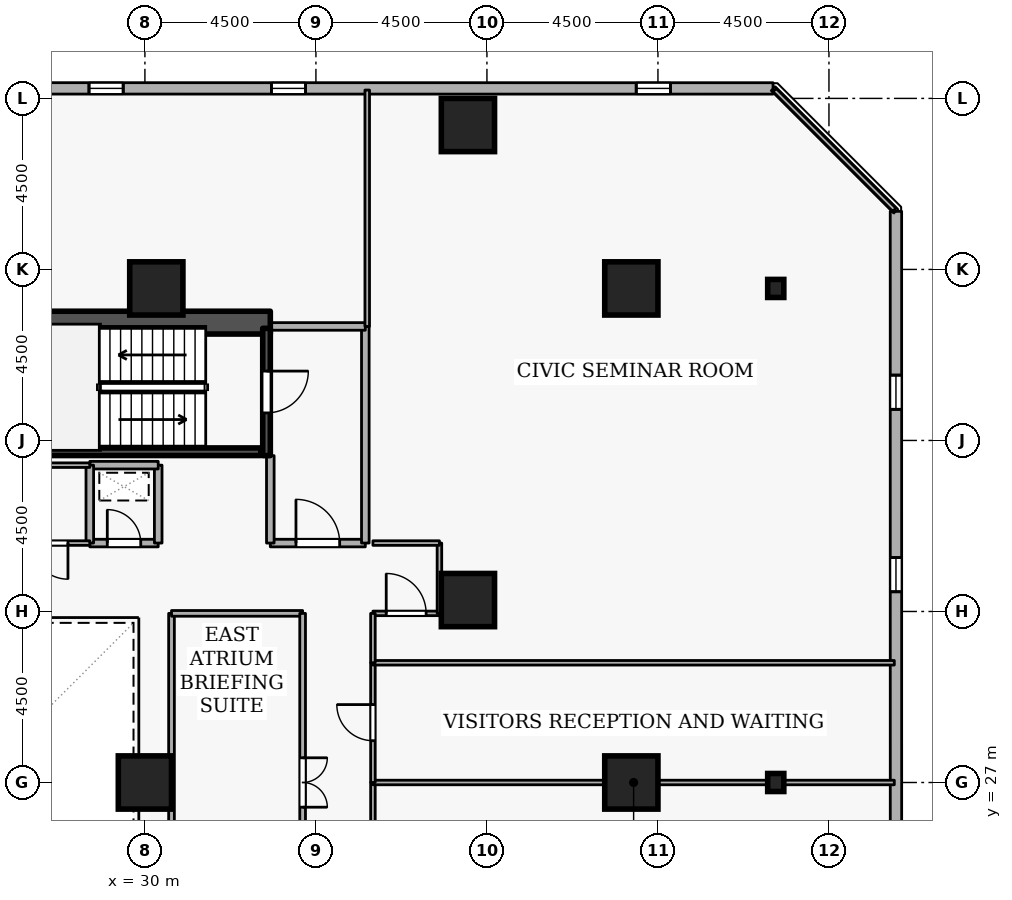
"""IFC4 building model, lengths in metres.
Left out: names, types, materials, properties, quantities, classifications, styles, units other than length and angle.
Written with IfcOpenShell. Run it as: python <this file> out.ifc"""

import sys

from ifc_helpers import new_model, si_unit, direction, frame, frame_2d, origin, origin_2d, place, context, subcontext, project, spatial, rectangle, i_section, extrude, element, fill, save


model = new_model("IFC4")
c1 = context("Model", 3, precision=1e-05, world=origin(), true_north=direction((0.0, 1.0)))
c2 = subcontext(c1, "Body", "Model", "MODEL_VIEW")
j1 = project(units=[si_unit("LENGTHUNIT", "METRE"), si_unit("PLANEANGLEUNIT", "RADIAN")], contexts=[c1])
p1 = place(None, origin())
s1 = spatial("IfcSite", under=j1, at=p1, CompositionType="ELEMENT")
p2 = place(p1, origin())
s2 = spatial("IfcBuilding", under=s1, at=p2, CompositionType="ELEMENT")
p3 = place(p2, frame((0.0, 0.0, 60.9)))
s3 = spatial("IfcBuildingStorey", under=s2, at=p3, CompositionType="ELEMENT", Elevation=60.9)
p4 = place(p3, frame((17.7, 39.1, 0.0), z_axis=(0.0, 0.0, 1.0), x_axis=(1.0, 0.0, 0.0)))
e1 = element("IfcWall", 1, at=p4, inside=s3, PredefinedType="SHEAR", context=c2, shape_type="SweptSolid", body=[
    extrude(rectangle(XDim=15.6, YDim=0.6, at=frame_2d((7.8, 0.0))), origin(), (0.0, 0.0, 1.0), 3.6),
])
for number, where, z_axis, x_axis in (
    (2, (42.8, 27.0, 0.0), (0.0, 0.0, 1.0), (1.0, 0.0, 0.0)),
    (3, (42.8, 40.0, 0.0), (0.0, 0.0, 1.0), (1.0, 0.0, 0.0)),
    (4, (38.5, 44.3, 0.0), (0.0, 0.0, 1.0), (1.0, 0.0, 0.0)),
    (5, (38.5, 31.8, 0.0), (0.0, 0.0, 1.0), (1.0, 0.0, 0.0)),
    (6, (30.3, 40.0, 0.0), (0.0, 0.0, 1.0), (1.0, 0.0, 0.0)),
    (7, (30.0, 27.0, 0.0), (0.0, 0.0, 1.0), (1.0, 0.0, 0.0)),
):
    element("IfcColumn", number, at=place(p3, frame(where, z_axis=z_axis, x_axis=x_axis)), inside=s3, PredefinedType="COLUMN", context=c2, shape_type="SweptSolid", body=[
        extrude(rectangle(XDim=1.4, YDim=1.4, at=origin_2d()), origin(), (0.0, 0.0, 1.0), 3.6),
    ])
for number, where, z_axis, x_axis in (
    (8, (46.6, 27.0, 0.0), (0.0, 0.0, 1.0), (1.0, 0.0, 0.0)),
    (9, (46.6, 40.0, 0.0), (0.0, 0.0, 1.0), (1.0, 0.0, 0.0)),
):
    element("IfcColumn", number, at=place(p3, frame(where, z_axis=z_axis, x_axis=x_axis)), inside=s3, PredefinedType="COLUMN", context=c2, shape_type="SweptSolid", body=[
        extrude(i_section(OverallWidth=0.424, OverallDepth=0.475, WebThickness=0.048, FlangeThickness=0.077, FilletRadius=0.015, at=origin_2d()), origin(), (0.0, 0.0, 1.0), 3.6),
    ])
p5 = place(p3, frame((49.765, 5.319, 0.0), z_axis=(0.0, 0.0, 1.0), x_axis=(-5.985515e-05, 0.999999998209, 0.0)))
e10 = element("IfcWall", 10, at=p5, inside=s3, PredefinedType="STANDARD", context=c2, shape_type="SweptSolid", body=[
    extrude(rectangle(XDim=36.71, YDim=0.3, at=frame_2d((18.355, 0.0))), origin(), (0.0, 0.0, 1.0), 2.7),
])
p6 = place(p5, frame((2.7, 0.0, 0.72)))
e11 = element("IfcOpeningElement", 11, at=p6, cuts=e10, PredefinedType="OPENING", context=c2, shape_type="SweptSolid", body=[
    extrude(rectangle(XDim=0.9, YDim=1.75, at=frame_2d((0.45, 0.875))), frame((0.0, 0.16, 0.0), z_axis=(0.0, -1.0, 0.0), x_axis=(1.0, 0.0, 0.0)), (0.0, 0.0, 1.0), 0.32),
])
p7 = place(p5, frame((12.3, 0.0, 0.72)))
e12 = element("IfcOpeningElement", 12, at=p7, cuts=e10, PredefinedType="OPENING", context=c2, shape_type="SweptSolid", body=[
    extrude(rectangle(XDim=0.9, YDim=1.75, at=frame_2d((0.45, 0.875))), frame((0.0, 0.16, 0.0), z_axis=(0.0, -1.0, 0.0), x_axis=(1.0, 0.0, 0.0)), (0.0, 0.0, 1.0), 0.32),
])
p8 = place(p5, frame((17.1, 0.0, 0.72)))
e13 = element("IfcOpeningElement", 13, at=p8, cuts=e10, PredefinedType="OPENING", context=c2, shape_type="SweptSolid", body=[
    extrude(rectangle(XDim=0.9, YDim=1.75, at=frame_2d((0.45, 0.875))), frame((0.0, 0.16, 0.0), z_axis=(0.0, -1.0, 0.0), x_axis=(1.0, 0.0, 0.0)), (0.0, 0.0, 1.0), 0.32),
])
p9 = place(p5, frame((26.7, 0.0, 0.72)))
e14 = element("IfcOpeningElement", 14, at=p9, cuts=e10, PredefinedType="OPENING", context=c2, shape_type="SweptSolid", body=[
    extrude(rectangle(XDim=0.9, YDim=1.75, at=frame_2d((0.45, 0.875))), frame((0.0, 0.16, 0.0), z_axis=(0.0, -1.0, 0.0), x_axis=(1.0, 0.0, 0.0)), (0.0, 0.0, 1.0), 0.32),
])
p10 = place(p5, frame((31.5, 0.0, 0.72)))
e15 = element("IfcOpeningElement", 15, at=p10, cuts=e10, PredefinedType="OPENING", context=c2, shape_type="SweptSolid", body=[
    extrude(rectangle(XDim=0.9, YDim=1.75, at=frame_2d((0.45, 0.875))), frame((0.0, 0.16, 0.0), z_axis=(0.0, -1.0, 0.0), x_axis=(1.0, 0.0, 0.0)), (0.0, 0.0, 1.0), 0.32),
])
p11 = place(p3, frame((46.529, 45.263, 0.0), z_axis=(0.0, 0.0, 1.0), x_axis=(-0.999999998209, 5.985515e-05, 0.0)))
e16 = element("IfcWall", 16, at=p11, inside=s3, PredefinedType="STANDARD", context=c2, shape_type="SweptSolid", body=[
    extrude(rectangle(XDim=36.71, YDim=0.3, at=frame_2d((18.355, 0.0))), origin(), (0.0, 0.0, 1.0), 2.7),
])
p12 = place(p11, frame((2.7, 0.0, 0.72)))
e17 = element("IfcOpeningElement", 17, at=p12, cuts=e16, PredefinedType="OPENING", context=c2, shape_type="SweptSolid", body=[
    extrude(rectangle(XDim=0.9, YDim=1.75, at=frame_2d((0.45, 0.875))), frame((0.0, 0.16, 0.0), z_axis=(0.0, -1.0, 0.0), x_axis=(1.0, 0.0, 0.0)), (0.0, 0.0, 1.0), 0.32),
])
p13 = place(p11, frame((12.3, 0.0, 0.72)))
e18 = element("IfcOpeningElement", 18, at=p13, cuts=e16, PredefinedType="OPENING", context=c2, shape_type="SweptSolid", body=[
    extrude(rectangle(XDim=0.9, YDim=1.75, at=frame_2d((0.45, 0.875))), frame((0.0, 0.16, 0.0), z_axis=(0.0, -1.0, 0.0), x_axis=(1.0, 0.0, 0.0)), (0.0, 0.0, 1.0), 0.32),
])
p14 = place(p11, frame((17.1, 0.0, 0.72)))
e19 = element("IfcOpeningElement", 19, at=p14, cuts=e16, PredefinedType="OPENING", context=c2, shape_type="SweptSolid", body=[
    extrude(rectangle(XDim=0.9, YDim=1.75, at=frame_2d((0.45, 0.875))), frame((0.0, 0.16, 0.0), z_axis=(0.0, -1.0, 0.0), x_axis=(1.0, 0.0, 0.0)), (0.0, 0.0, 1.0), 0.32),
])
p15 = place(p11, frame((26.7, 0.0, 0.72)))
e20 = element("IfcOpeningElement", 20, at=p15, cuts=e16, PredefinedType="OPENING", context=c2, shape_type="SweptSolid", body=[
    extrude(rectangle(XDim=0.9, YDim=1.75, at=frame_2d((0.45, 0.875))), frame((0.0, 0.16, 0.0), z_axis=(0.0, -1.0, 0.0), x_axis=(1.0, 0.0, 0.0)), (0.0, 0.0, 1.0), 0.32),
])
p16 = place(p11, frame((31.5, 0.0, 0.72)))
e21 = element("IfcOpeningElement", 21, at=p16, cuts=e16, PredefinedType="OPENING", context=c2, shape_type="SweptSolid", body=[
    extrude(rectangle(XDim=0.9, YDim=1.75, at=frame_2d((0.45, 0.875))), frame((0.0, 0.16, 0.0), z_axis=(0.0, -1.0, 0.0), x_axis=(1.0, 0.0, 0.0)), (0.0, 0.0, 1.0), 0.32),
])
p17 = place(p3, frame((33.2, 38.95, 0.0), z_axis=(0.0, 0.0, 1.0), x_axis=(0.0, -1.0, 0.0)))
e22 = element("IfcWall", 22, at=p17, inside=s3, PredefinedType="SHEAR", context=c2, shape_type="SweptSolid", body=[
    extrude(rectangle(XDim=3.35, YDim=0.2, at=frame_2d((1.675, 0.0))), origin(), (0.0, 0.0, 1.0), 3.6),
])
p18 = place(p17, frame((1.125, 0.0, 0.0)))
e23 = element("IfcOpeningElement", 23, at=p18, cuts=e22, PredefinedType="OPENING", context=c2, shape_type="SweptSolid", body=[
    extrude(rectangle(XDim=1.1, YDim=2.1, at=frame_2d((0.55, 1.05))), frame((0.0, 0.11, 0.0), z_axis=(0.0, -1.0, 0.0), x_axis=(1.0, 0.0, 0.0)), (0.0, 0.0, 1.0), 0.22),
])
p19 = place(p3, frame((25.95, 35.703, 0.0), z_axis=(0.0, 0.0, 1.0), x_axis=(1.0, 0.0, 0.0)))
e24 = element("IfcWall", 24, at=p19, inside=s3, PredefinedType="SHEAR", context=c2, shape_type="SweptSolid", body=[
    extrude(rectangle(XDim=7.1, YDim=0.2, at=frame_2d((3.55, 0.0))), origin(), (0.0, 0.0, 1.0), 3.6),
])
p20 = place(p3, frame((33.3, 33.3, 0.0), z_axis=(0.0, 0.0, 1.0), x_axis=(1.0, 0.0, 0.0)))
e25 = element("IfcWall", 25, at=p20, inside=s3, PredefinedType="STANDARD", context=c2, shape_type="SweptSolid", body=[
    extrude(rectangle(XDim=2.5, YDim=0.2, at=frame_2d((1.25, 0.0))), origin(), (0.0, 0.0, 1.0), 3.34),
])
p21 = place(p20, frame((0.675, 0.0, 0.0)))
e26 = element("IfcOpeningElement", 26, at=p21, cuts=e25, PredefinedType="OPENING", context=c2, shape_type="SweptSolid", body=[
    extrude(rectangle(XDim=1.15, YDim=2.1, at=frame_2d((0.575, 1.05))), frame((0.0, 0.11, 0.0), z_axis=(0.0, -1.0, 0.0), x_axis=(1.0, 0.0, 0.0)), (0.0, 0.0, 1.0), 0.22),
])
p22 = place(p3, frame((35.8, 33.3, 0.0), z_axis=(0.0, 0.0, 1.0), x_axis=(0.0, 1.0, 0.0)))
e27 = element("IfcWall", 27, at=p22, inside=s3, PredefinedType="STANDARD", context=c2, shape_type="SweptSolid", body=[
    extrude(rectangle(XDim=5.7, YDim=0.2, at=frame_2d((2.85, 0.0))), origin(), (0.0, 0.0, 1.0), 3.34),
])
p23 = place(p3, frame((35.8, 39.0, 0.0), z_axis=(0.0, 0.0, 1.0), x_axis=(-1.0, 0.0, 0.0)))
e28 = element("IfcWall", 28, at=p23, inside=s3, PredefinedType="STANDARD", context=c2, shape_type="SweptSolid", body=[
    extrude(rectangle(XDim=2.5, YDim=0.2, at=frame_2d((1.25, 0.0))), origin(), (0.0, 0.0, 1.0), 3.34),
])
p24 = place(p3, frame((33.3, 35.6, 0.0), z_axis=(0.0, 0.0, 1.0), x_axis=(0.0, -1.0, 0.0)))
e29 = element("IfcWall", 29, at=p24, inside=s3, PredefinedType="STANDARD", context=c2, shape_type="SweptSolid", body=[
    extrude(rectangle(XDim=2.3, YDim=0.2, at=frame_2d((1.15, 0.0))), origin(), (0.0, 0.0, 1.0), 2.545),
])
p25 = place(p3, frame((28.55, 33.3, 0.0), z_axis=(0.0, 0.0, 1.0), x_axis=(1.0, 0.0, 0.0)))
e30 = element("IfcWall", 30, at=p25, inside=s3, PredefinedType="STANDARD", context=c2, shape_type="SweptSolid", body=[
    extrude(rectangle(XDim=1.8, YDim=0.2, at=frame_2d((0.9, 0.0))), origin(), (0.0, 0.0, 1.0), 3.34),
])
p26 = place(p25, frame((0.46, 0.0, 0.0)))
e31 = element("IfcOpeningElement", 31, at=p26, cuts=e30, PredefinedType="OPENING", context=c2, shape_type="SweptSolid", body=[
    extrude(rectangle(XDim=0.88, YDim=2.04, at=frame_2d((0.44, 1.02))), frame((0.0, 0.11, 0.0), z_axis=(0.0, -1.0, 0.0), x_axis=(1.0, 0.0, 0.0)), (0.0, 0.0, 1.0), 0.22),
])
p27 = place(p3, frame((30.35, 33.3, 0.0), z_axis=(0.0, 0.0, 1.0), x_axis=(0.0, 1.0, 0.0)))
e32 = element("IfcWall", 32, at=p27, inside=s3, PredefinedType="STANDARD", context=c2, shape_type="SweptSolid", body=[
    extrude(rectangle(XDim=2.05, YDim=0.2, at=frame_2d((1.025, 0.0))), origin(), (0.0, 0.0, 1.0), 3.34),
])
p28 = place(p3, frame((30.35, 35.35, 0.0), z_axis=(0.0, 0.0, 1.0), x_axis=(-1.0, 0.0, 0.0)))
e33 = element("IfcWall", 33, at=p28, inside=s3, PredefinedType="STANDARD", context=c2, shape_type="SweptSolid", body=[
    extrude(rectangle(XDim=1.8, YDim=0.2, at=frame_2d((0.9, 0.0))), origin(), (0.0, 0.0, 1.0), 3.34),
])
p29 = place(p3, frame((28.55, 35.35, 0.0), z_axis=(0.0, 0.0, 1.0), x_axis=(0.0, -1.0, 0.0)))
e34 = element("IfcWall", 34, at=p29, inside=s3, PredefinedType="STANDARD", context=c2, shape_type="SweptSolid", body=[
    extrude(rectangle(XDim=2.05, YDim=0.2, at=frame_2d((1.025, 0.0))), origin(), (0.0, 0.0, 1.0), 3.34),
])
p30 = place(p3, frame((26.45, 35.35, 0.0), z_axis=(0.0, 0.0, 1.0), x_axis=(1.0, 0.0, 0.0)))
e35 = element("IfcWall", 35, at=p30, inside=s3, PredefinedType="PARTITIONING", context=c2, shape_type="SweptSolid", body=[
    extrude(rectangle(XDim=2.1, YDim=0.12, at=frame_2d((1.05, 0.0))), origin(), (0.0, 0.0, 1.0), 3.34),
])
p31 = place(p3, frame((28.55, 33.3, 0.0), z_axis=(0.0, 0.0, 1.0), x_axis=(-1.0, 0.0, 0.0)))
e36 = element("IfcWall", 36, at=p31, inside=s3, PredefinedType="PARTITIONING", context=c2, shape_type="SweptSolid", body=[
    extrude(rectangle(XDim=2.1, YDim=0.12, at=frame_2d((1.05, 0.0))), origin(), (0.0, 0.0, 1.0), 3.34),
])
p32 = place(p31, frame((0.575, 0.0, 0.0)))
e37 = element("IfcOpeningElement", 37, at=p32, cuts=e36, PredefinedType="OPENING", context=c2, shape_type="SweptSolid", body=[
    extrude(rectangle(XDim=0.95, YDim=2.1, at=frame_2d((0.475, 1.05))), frame((0.0, 0.07, 0.0), z_axis=(0.0, -1.0, 0.0), x_axis=(1.0, 0.0, 0.0)), (0.0, 0.0, 1.0), 0.14),
])
p33 = place(p3, frame((36.0, 22.55, 0.0), z_axis=(0.0, 0.0, 1.0), x_axis=(0.0, 1.0, 0.0)))
e38 = element("IfcWall", 38, at=p33, inside=s3, PredefinedType="PARTITIONING", context=c2, shape_type="SweptSolid", body=[
    extrude(rectangle(XDim=4.45, YDim=0.12, at=frame_2d((2.225, 0.0))), origin(), (0.0, 0.0, 1.0), 3.34),
])
p34 = place(p33, frame((1.7, 0.0, 0.0)))
e39 = element("IfcOpeningElement", 39, at=p34, cuts=e38, PredefinedType="OPENING", context=c2, shape_type="SweptSolid", body=[
    extrude(rectangle(XDim=1.05, YDim=2.1, at=frame_2d((0.525, 1.05))), frame((0.0, 0.07, 0.0), z_axis=(0.0, -1.0, 0.0), x_axis=(1.0, 0.0, 0.0)), (0.0, 0.0, 1.0), 0.14),
])
p35 = place(p3, frame((36.0, 27.0, 0.0), z_axis=(0.0, 0.0, 1.0), x_axis=(1.0, 0.0, 0.0)))
e40 = element("IfcWall", 40, at=p35, inside=s3, PredefinedType="PARTITIONING", context=c2, shape_type="SweptSolid", body=[
    extrude(rectangle(XDim=13.72, YDim=0.12, at=frame_2d((6.86, 0.0))), origin(), (0.0, 0.0, 1.0), 2.878),
])
p36 = place(p3, frame((36.0, 27.0, 0.0), z_axis=(0.0, 0.0, 1.0), x_axis=(0.0, 1.0, 0.0)))
e41 = element("IfcWall", 41, at=p36, inside=s3, PredefinedType="PARTITIONING", context=c2, shape_type="SweptSolid", body=[
    extrude(rectangle(XDim=3.15, YDim=0.12, at=frame_2d((1.575, 0.0))), origin(), (0.0, 0.0, 1.0), 3.34),
])
p37 = place(p36, frame((1.1, 0.0, 0.0)))
e42 = element("IfcOpeningElement", 42, at=p37, cuts=e41, PredefinedType="OPENING", context=c2, shape_type="SweptSolid", body=[
    extrude(rectangle(XDim=0.95, YDim=2.1, at=frame_2d((0.475, 1.05))), frame((0.0, 0.07, 0.0), z_axis=(0.0, -1.0, 0.0), x_axis=(1.0, 0.0, 0.0)), (0.0, 0.0, 1.0), 0.14),
])
p38 = place(p3, frame((36.0, 30.15, 0.0), z_axis=(0.0, 0.0, 1.0), x_axis=(1.0, 0.0, 0.0)))
e43 = element("IfcWall", 43, at=p38, inside=s3, PredefinedType="PARTITIONING", context=c2, shape_type="SweptSolid", body=[
    extrude(rectangle(XDim=13.72, YDim=0.12, at=frame_2d((6.86, 0.0))), origin(), (0.0, 0.0, 1.0), 3.34),
])
p39 = place(p3, frame((36.0, 31.45, 0.0), z_axis=(0.0, 0.0, 1.0), x_axis=(1.0, 0.0, 0.0)))
e44 = element("IfcWall", 44, at=p39, inside=s3, PredefinedType="PARTITIONING", context=c2, shape_type="SweptSolid", body=[
    extrude(rectangle(XDim=1.75, YDim=0.12, at=frame_2d((0.875, 0.0))), origin(), (0.0, 0.0, 1.0), 3.34),
])
p40 = place(p39, frame((0.35, 0.0, 0.0)))
e45 = element("IfcOpeningElement", 45, at=p40, cuts=e44, PredefinedType="OPENING", context=c2, shape_type="SweptSolid", body=[
    extrude(rectangle(XDim=1.05, YDim=2.1, at=frame_2d((0.525, 1.05))), frame((0.0, 0.07, 0.0), z_axis=(0.0, -1.0, 0.0), x_axis=(1.0, 0.0, 0.0)), (0.0, 0.0, 1.0), 0.14),
])
p41 = place(p3, frame((37.75, 31.45, 0.0), z_axis=(0.0, 0.0, 1.0), x_axis=(0.0, 1.0, 0.0)))
e46 = element("IfcWall", 46, at=p41, inside=s3, PredefinedType="PARTITIONING", context=c2, shape_type="SweptSolid", body=[
    extrude(rectangle(XDim=1.85, YDim=0.12, at=frame_2d((0.925, 0.0))), origin(), (0.0, 0.0, 1.0), 3.34),
])
p42 = place(p3, frame((37.75, 33.3, 0.0), z_axis=(0.0, 0.0, 1.0), x_axis=(-1.0, 0.0, 0.0)))
e47 = element("IfcWall", 47, at=p42, inside=s3, PredefinedType="PARTITIONING", context=c2, shape_type="SweptSolid", body=[
    extrude(rectangle(XDim=1.75, YDim=0.12, at=frame_2d((0.875, 0.0))), origin(), (0.0, 0.0, 1.0), 3.34),
])
p43 = place(p3, frame((35.85, 39.0, 0.0), z_axis=(0.0, 0.0, 1.0), x_axis=(0.0, 1.0, 0.0)))
e48 = element("IfcWall", 48, at=p43, inside=s3, PredefinedType="PARTITIONING", context=c2, shape_type="SweptSolid", body=[
    extrude(rectangle(XDim=6.22, YDim=0.12, at=frame_2d((3.11, 0.0))), origin(), (0.0, 0.0, 1.0), 3.34),
])
p44 = place(p3, frame((46.57, 45.22, 0.0), z_axis=(0.0, 0.0, 1.0), x_axis=(0.707106781187, -0.707106781187, 0.0)))
e49 = element("IfcWall", 49, at=p44, inside=s3, PredefinedType="PARTITIONING", context=c2, shape_type="SweptSolid", body=[
    extrude(rectangle(XDim=4.454, YDim=0.12, at=frame_2d((2.227, 0.0))), origin(), (0.0, 0.0, 1.0), 3.34),
])
p45 = place(p3, frame((36.0, 30.15, 0.0), z_axis=(0.0, 0.0, 1.0), x_axis=(0.0, 1.0, 0.0)))
e50 = element("IfcWall", 50, at=p45, inside=s3, PredefinedType="PARTITIONING", context=c2, shape_type="SweptSolid", body=[
    extrude(rectangle(XDim=1.3, YDim=0.12, at=frame_2d((0.65, 0.0))), origin(), (0.0, 0.0, 1.0), 3.34),
])
p46 = place(p3, frame((30.7, 22.55, 0.0), z_axis=(0.0, 0.0, 1.0), x_axis=(0.0, 1.0, 0.0)))
e51 = element("IfcWall", 51, at=p46, inside=s3, PredefinedType="PARTITIONING", context=c2, shape_type="SweptSolid", body=[
    extrude(rectangle(XDim=8.9, YDim=0.15, at=frame_2d((4.45, 0.0))), origin(), (0.0, 0.0, 1.0), 3.34),
])
p47 = place(p3, frame((30.7, 31.45, 0.0), z_axis=(0.0, 0.0, 1.0), x_axis=(1.0, 0.0, 0.0)))
e52 = element("IfcWall", 52, at=p47, inside=s3, PredefinedType="PARTITIONING", context=c2, shape_type="SweptSolid", body=[
    extrude(rectangle(XDim=3.45, YDim=0.15, at=frame_2d((1.725, 0.0))), origin(), (0.0, 0.0, 1.0), 3.34),
])
p48 = place(p3, frame((34.15, 31.45, 0.0), z_axis=(0.0, 0.0, 1.0), x_axis=(0.0, -1.0, 0.0)))
e53 = element("IfcWall", 53, at=p48, inside=s3, PredefinedType="PARTITIONING", context=c2, shape_type="SweptSolid", body=[
    extrude(rectangle(XDim=8.9, YDim=0.15, at=frame_2d((4.45, 0.0))), origin(), (0.0, 0.0, 1.0), 3.34),
])
p49 = place(p48, frame((3.8, 0.0, 0.0)))
e54 = element("IfcOpeningElement", 54, at=p49, cuts=e53, PredefinedType="OPENING", context=c2, shape_type="SweptSolid", body=[
    extrude(rectangle(XDim=1.3, YDim=2.12, at=frame_2d((0.65, 1.06))), frame((0.0, 0.085, 0.0), z_axis=(0.0, -1.0, 0.0), x_axis=(1.0, 0.0, 0.0)), (0.0, 0.0, 1.0), 0.17),
])
p50 = place(p9, origin())
e55 = element("IfcWindow", 55, at=p50, inside=s3, PartitioningType="SINGLE_PANEL", PredefinedType="WINDOW", context=c2, shape_type="SweptSolid", body=[
    extrude(rectangle(XDim=0.9, YDim=1.75, at=frame_2d((0.45, 0.875))), frame((0.0, 0.03, 0.0), z_axis=(0.0, -1.0, 0.0), x_axis=(1.0, 0.0, 0.0)), (0.0, 0.0, 1.0), 0.06),
])
fill(e14, e55)
p51 = place(p10, origin())
e56 = element("IfcWindow", 56, at=p51, inside=s3, PartitioningType="SINGLE_PANEL", PredefinedType="WINDOW", context=c2, shape_type="SweptSolid", body=[
    extrude(rectangle(XDim=0.9, YDim=1.75, at=frame_2d((0.45, 0.875))), frame((0.0, 0.03, 0.0), z_axis=(0.0, -1.0, 0.0), x_axis=(1.0, 0.0, 0.0)), (0.0, 0.0, 1.0), 0.06),
])
fill(e15, e56)
p52 = place(p12, origin())
e57 = element("IfcWindow", 57, at=p52, inside=s3, PartitioningType="SINGLE_PANEL", PredefinedType="WINDOW", context=c2, shape_type="SweptSolid", body=[
    extrude(rectangle(XDim=0.9, YDim=1.75, at=frame_2d((0.45, 0.875))), frame((0.0, 0.03, 0.0), z_axis=(0.0, -1.0, 0.0), x_axis=(1.0, 0.0, 0.0)), (0.0, 0.0, 1.0), 0.06),
])
fill(e17, e57)
p53 = place(p13, origin())
e58 = element("IfcWindow", 58, at=p53, inside=s3, PartitioningType="SINGLE_PANEL", PredefinedType="WINDOW", context=c2, shape_type="SweptSolid", body=[
    extrude(rectangle(XDim=0.9, YDim=1.75, at=frame_2d((0.45, 0.875))), frame((0.0, 0.03, 0.0), z_axis=(0.0, -1.0, 0.0), x_axis=(1.0, 0.0, 0.0)), (0.0, 0.0, 1.0), 0.06),
])
fill(e18, e58)
p54 = place(p14, origin())
e59 = element("IfcWindow", 59, at=p54, inside=s3, PartitioningType="SINGLE_PANEL", PredefinedType="WINDOW", context=c2, shape_type="SweptSolid", body=[
    extrude(rectangle(XDim=0.9, YDim=1.75, at=frame_2d((0.45, 0.875))), frame((0.0, 0.03, 0.0), z_axis=(0.0, -1.0, 0.0), x_axis=(1.0, 0.0, 0.0)), (0.0, 0.0, 1.0), 0.06),
])
fill(e19, e59)
p55 = place(p18, origin())
e60 = element("IfcDoor", 60, at=p55, inside=s3, OperationType="SINGLE_SWING_LEFT", PredefinedType="DOOR", context=c2, shape_type="SweptSolid", body=[
    extrude(rectangle(XDim=1.1, YDim=2.1, at=frame_2d((0.55, 1.05))), frame((0.0, 0.025, 0.0), z_axis=(0.0, -1.0, 0.0), x_axis=(1.0, 0.0, 0.0)), (0.0, 0.0, 1.0), 0.05),
])
fill(e23, e60)
p56 = place(p21, origin())
e61 = element("IfcDoor", 61, at=p56, inside=s3, OperationType="SINGLE_SWING_LEFT", PredefinedType="DOOR", context=c2, shape_type="SweptSolid", body=[
    extrude(rectangle(XDim=1.15, YDim=2.1, at=frame_2d((0.575, 1.05))), frame((0.0, 0.025, 0.0), z_axis=(0.0, -1.0, 0.0), x_axis=(1.0, 0.0, 0.0)), (0.0, 0.0, 1.0), 0.05),
])
fill(e26, e61)
p57 = place(p26, origin())
e62 = element("IfcDoor", 62, at=p57, inside=s3, OperationType="SINGLE_SWING_LEFT", PredefinedType="DOOR", context=c2, shape_type="SweptSolid", body=[
    extrude(rectangle(XDim=0.88, YDim=2.04, at=frame_2d((0.44, 1.02))), frame((0.0, 0.025, 0.0), z_axis=(0.0, -1.0, 0.0), x_axis=(1.0, 0.0, 0.0)), (0.0, 0.0, 1.0), 0.05),
])
fill(e31, e62)
p58 = place(p32, origin())
e63 = element("IfcDoor", 63, at=p58, inside=s3, OperationType="SINGLE_SWING_LEFT", PredefinedType="DOOR", context=c2, shape_type="SweptSolid", body=[
    extrude(rectangle(XDim=0.95, YDim=2.1, at=frame_2d((0.475, 1.05))), frame((0.0, 0.025, 0.0), z_axis=(0.0, -1.0, 0.0), x_axis=(1.0, 0.0, 0.0)), (0.0, 0.0, 1.0), 0.05),
])
fill(e37, e63)
p59 = place(p37, origin())
e64 = element("IfcDoor", 64, at=p59, inside=s3, OperationType="SINGLE_SWING_RIGHT", PredefinedType="DOOR", context=c2, shape_type="SweptSolid", body=[
    extrude(rectangle(XDim=0.95, YDim=2.1, at=frame_2d((0.475, 1.05))), frame((0.0, 0.025, 0.0), z_axis=(0.0, -1.0, 0.0), x_axis=(1.0, 0.0, 0.0)), (0.0, 0.0, 1.0), 0.05),
])
fill(e42, e64)
p60 = place(p40, origin())
e65 = element("IfcDoor", 65, at=p60, inside=s3, OperationType="SINGLE_SWING_LEFT", PredefinedType="DOOR", context=c2, shape_type="SweptSolid", body=[
    extrude(rectangle(XDim=1.05, YDim=2.1, at=frame_2d((0.525, 1.05))), frame((0.0, 0.025, 0.0), z_axis=(0.0, -1.0, 0.0), x_axis=(1.0, 0.0, 0.0)), (0.0, 0.0, 1.0), 0.05),
])
fill(e45, e65)
p61 = place(p49, origin())
e66 = element("IfcDoor", 66, at=p61, inside=s3, OperationType="DOUBLE_DOOR_SINGLE_SWING", PredefinedType="DOOR", context=c2, shape_type="SweptSolid", body=[
    extrude(rectangle(XDim=1.3, YDim=2.12, at=frame_2d((0.65, 1.06))), frame((0.0, 0.025, 0.0), z_axis=(0.0, -1.0, 0.0), x_axis=(1.0, 0.0, 0.0)), (0.0, 0.0, 1.0), 0.05),
])
fill(e54, e66)
save(model, sys.argv[1])
